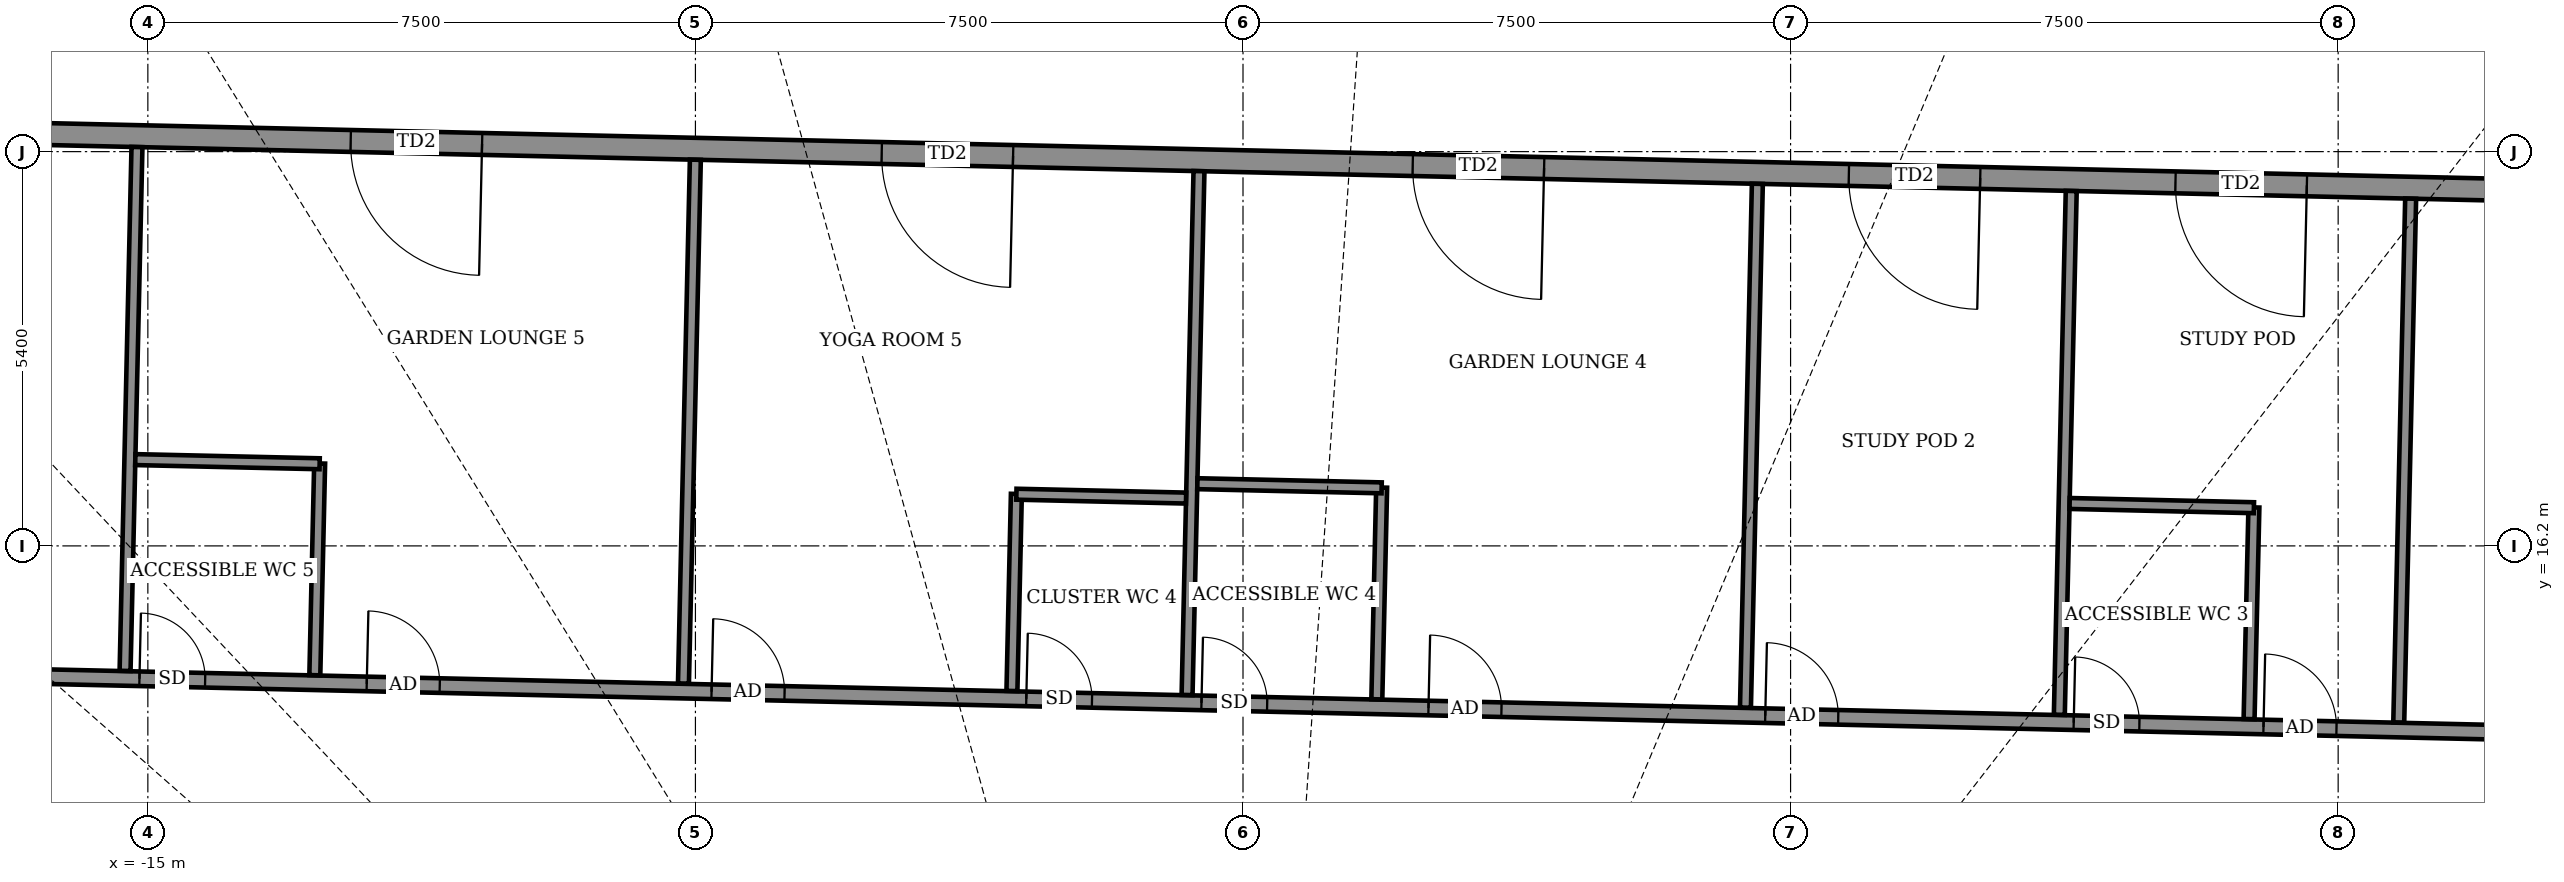
"""IFC4 building model, lengths in metres.
Left out: names, types, materials, properties, quantities, classifications, styles, units other than length and angle.
Written with IfcOpenShell. Run it as: python <this file> out.ifc"""

import sys

from ifc_helpers import new_model, si_unit, direction, frame, frame_2d, origin, place, context, subcontext, project, spatial, rectangle, extrude, element, fill, save


model = new_model("IFC4")
c1 = context("Model", 3, precision=1e-05, world=origin(), true_north=direction((0.0, 1.0)))
c2 = subcontext(c1, "Body", "Model", "MODEL_VIEW")
j1 = project(units=[si_unit("LENGTHUNIT", "METRE"), si_unit("PLANEANGLEUNIT", "RADIAN")], contexts=[c1])
p1 = place(None, origin())
s1 = spatial("IfcSite", under=j1, at=p1, CompositionType="ELEMENT")
p2 = place(p1, origin())
s2 = spatial("IfcBuilding", under=s1, at=p2, CompositionType="ELEMENT")
p3 = place(p2, frame((0.0, 0.0, 337.9)))
s3 = spatial("IfcBuildingStorey", under=s2, at=p3, CompositionType="ELEMENT", Elevation=337.9)
p4 = place(p3, frame((23.394, 20.938, 0.0), z_axis=(0.0, 0.0, 1.0), x_axis=(-0.99974255281, 0.02268982375, 0.0)))
e1 = element("IfcWall", 1, at=p4, inside=s3, PredefinedType="SOLIDWALL", context=c2, shape_type="SweptSolid", body=[
    extrude(rectangle(XDim=43.9, YDim=0.3, at=frame_2d((21.95, 0.0))), origin(), (0.0, 0.0, 1.0), 2.1),
])
p5 = place(p4, frame((3.151, 0.0, 0.0)))
e2 = element("IfcOpeningElement", 2, at=p5, cuts=e1, PredefinedType="OPENING", context=c2, shape_type="SweptSolid", body=[
    extrude(rectangle(XDim=1.8, YDim=2.0, at=frame_2d((0.9, 1.0))), frame((0.0, 0.16, 0.0), z_axis=(0.0, -1.0, 0.0), x_axis=(1.0, 0.0, 0.0)), (0.0, 0.0, 1.0), 0.32),
])
p6 = place(p4, frame((8.825, 0.0, 0.0)))
e3 = element("IfcOpeningElement", 3, at=p6, cuts=e1, PredefinedType="OPENING", context=c2, shape_type="SweptSolid", body=[
    extrude(rectangle(XDim=1.8, YDim=2.0, at=frame_2d((0.9, 1.0))), frame((0.0, 0.16, 0.0), z_axis=(0.0, -1.0, 0.0), x_axis=(1.0, 0.0, 0.0)), (0.0, 0.0, 1.0), 0.32),
])
p7 = place(p4, frame((13.3, 0.0, 0.0)))
e4 = element("IfcOpeningElement", 4, at=p7, cuts=e1, PredefinedType="OPENING", context=c2, shape_type="SweptSolid", body=[
    extrude(rectangle(XDim=1.8, YDim=2.0, at=frame_2d((0.9, 1.0))), frame((0.0, 0.16, 0.0), z_axis=(0.0, -1.0, 0.0), x_axis=(1.0, 0.0, 0.0)), (0.0, 0.0, 1.0), 0.32),
])
p8 = place(p4, frame((19.275, 0.0, 0.0)))
e5 = element("IfcOpeningElement", 5, at=p8, cuts=e1, PredefinedType="OPENING", context=c2, shape_type="SweptSolid", body=[
    extrude(rectangle(XDim=1.8, YDim=2.0, at=frame_2d((0.9, 1.0))), frame((0.0, 0.16, 0.0), z_axis=(0.0, -1.0, 0.0), x_axis=(1.0, 0.0, 0.0)), (0.0, 0.0, 1.0), 0.32),
])
p9 = place(p4, frame((26.55, 0.0, 0.0)))
e6 = element("IfcOpeningElement", 6, at=p9, cuts=e1, PredefinedType="OPENING", context=c2, shape_type="SweptSolid", body=[
    extrude(rectangle(XDim=1.8, YDim=2.0, at=frame_2d((0.9, 1.0))), frame((0.0, 0.16, 0.0), z_axis=(0.0, -1.0, 0.0), x_axis=(1.0, 0.0, 0.0)), (0.0, 0.0, 1.0), 0.32),
])
p10 = place(p4, frame((33.825, 0.0, 0.0)))
e7 = element("IfcOpeningElement", 7, at=p10, cuts=e1, PredefinedType="OPENING", context=c2, shape_type="SweptSolid", body=[
    extrude(rectangle(XDim=1.8, YDim=2.0, at=frame_2d((0.9, 1.0))), frame((0.0, 0.16, 0.0), z_axis=(0.0, -1.0, 0.0), x_axis=(1.0, 0.0, 0.0)), (0.0, 0.0, 1.0), 0.32),
])
p11 = place(p4, frame((40.4, 0.0, 0.0)))
e8 = element("IfcOpeningElement", 8, at=p11, cuts=e1, PredefinedType="OPENING", context=c2, shape_type="SweptSolid", body=[
    extrude(rectangle(XDim=1.8, YDim=2.0, at=frame_2d((0.9, 1.0))), frame((0.0, 0.16, 0.0), z_axis=(0.0, -1.0, 0.0), x_axis=(1.0, 0.0, 0.0)), (0.0, 0.0, 1.0), 0.32),
])
p12 = place(p3, frame((-23.213, 14.564, 0.0), z_axis=(0.0, 0.0, 1.0), x_axis=(0.999742437097, -0.022694921611, 0.0)))
e9 = element("IfcWall", 9, at=p12, inside=s3, PredefinedType="PARTITIONING", context=c2, shape_type="SweptSolid", body=[
    extrude(rectangle(XDim=49.0, YDim=0.2, at=frame_2d((24.5, 0.0))), origin(), (0.0, 0.0, 1.0), 2.1),
])
p13 = place(p12, frame((42.951, 0.0, 0.0)))
e10 = element("IfcOpeningElement", 10, at=p13, cuts=e9, PredefinedType="OPENING", context=c2, shape_type="SweptSolid", body=[
    extrude(rectangle(XDim=1.0, YDim=2.1, at=frame_2d((0.5, 1.05))), frame((0.0, 0.11, 0.0), z_axis=(0.0, -1.0, 0.0), x_axis=(1.0, 0.0, 0.0)), (0.0, 0.0, 1.0), 0.22),
])
p14 = place(p12, frame((37.2, 0.0, 0.0)))
e11 = element("IfcOpeningElement", 11, at=p14, cuts=e9, PredefinedType="OPENING", context=c2, shape_type="SweptSolid", body=[
    extrude(rectangle(XDim=1.0, YDim=2.1, at=frame_2d((0.5, 1.05))), frame((0.0, 0.11, 0.0), z_axis=(0.0, -1.0, 0.0), x_axis=(1.0, 0.0, 0.0)), (0.0, 0.0, 1.0), 0.22),
])
p15 = place(p12, frame((34.6, 0.0, 0.0)))
e12 = element("IfcOpeningElement", 12, at=p15, cuts=e9, PredefinedType="OPENING", context=c2, shape_type="SweptSolid", body=[
    extrude(rectangle(XDim=0.9, YDim=2.1, at=frame_2d((0.45, 1.05))), frame((0.0, 0.11, 0.0), z_axis=(0.0, -1.0, 0.0), x_axis=(1.0, 0.0, 0.0)), (0.0, 0.0, 1.0), 0.22),
])
p16 = place(p12, frame((30.374, 0.0, 0.0)))
e13 = element("IfcOpeningElement", 13, at=p16, cuts=e9, PredefinedType="OPENING", context=c2, shape_type="SweptSolid", body=[
    extrude(rectangle(XDim=1.0, YDim=2.1, at=frame_2d((0.5, 1.05))), frame((0.0, 0.11, 0.0), z_axis=(0.0, -1.0, 0.0), x_axis=(1.0, 0.0, 0.0)), (0.0, 0.0, 1.0), 0.22),
])
p17 = place(p12, frame((25.76, 0.0, 0.0)))
e14 = element("IfcOpeningElement", 14, at=p17, cuts=e9, PredefinedType="OPENING", context=c2, shape_type="SweptSolid", body=[
    extrude(rectangle(XDim=1.0, YDim=2.1, at=frame_2d((0.5, 1.05))), frame((0.0, 0.11, 0.0), z_axis=(0.0, -1.0, 0.0), x_axis=(1.0, 0.0, 0.0)), (0.0, 0.0, 1.0), 0.22),
])
p18 = place(p12, frame((22.65, 0.0, 0.0)))
e15 = element("IfcOpeningElement", 15, at=p18, cuts=e9, PredefinedType="OPENING", context=c2, shape_type="SweptSolid", body=[
    extrude(rectangle(XDim=0.9, YDim=2.1, at=frame_2d((0.45, 1.05))), frame((0.0, 0.11, 0.0), z_axis=(0.0, -1.0, 0.0), x_axis=(1.0, 0.0, 0.0)), (0.0, 0.0, 1.0), 0.22),
])
p19 = place(p12, frame((15.938, 0.0, 0.0)))
e16 = element("IfcOpeningElement", 16, at=p19, cuts=e9, PredefinedType="OPENING", context=c2, shape_type="SweptSolid", body=[
    extrude(rectangle(XDim=1.0, YDim=2.1, at=frame_2d((0.5, 1.05))), frame((0.0, 0.11, 0.0), z_axis=(0.0, -1.0, 0.0), x_axis=(1.0, 0.0, 0.0)), (0.0, 0.0, 1.0), 0.22),
])
p20 = place(p12, frame((20.25, 0.0, 0.0)))
e17 = element("IfcOpeningElement", 17, at=p20, cuts=e9, PredefinedType="OPENING", context=c2, shape_type="SweptSolid", body=[
    extrude(rectangle(XDim=0.9, YDim=2.1, at=frame_2d((0.45, 1.05))), frame((0.0, 0.11, 0.0), z_axis=(0.0, -1.0, 0.0), x_axis=(1.0, 0.0, 0.0)), (0.0, 0.0, 1.0), 0.22),
])
p21 = place(p12, frame((11.214, 0.0, 0.0)))
e18 = element("IfcOpeningElement", 18, at=p21, cuts=e9, PredefinedType="OPENING", context=c2, shape_type="SweptSolid", body=[
    extrude(rectangle(XDim=1.0, YDim=2.1, at=frame_2d((0.5, 1.05))), frame((0.0, 0.11, 0.0), z_axis=(0.0, -1.0, 0.0), x_axis=(1.0, 0.0, 0.0)), (0.0, 0.0, 1.0), 0.22),
])
p22 = place(p12, frame((8.1, 0.0, 0.0)))
e19 = element("IfcOpeningElement", 19, at=p22, cuts=e9, PredefinedType="OPENING", context=c2, shape_type="SweptSolid", body=[
    extrude(rectangle(XDim=0.9, YDim=2.1, at=frame_2d((0.45, 1.05))), frame((0.0, 0.11, 0.0), z_axis=(0.0, -1.0, 0.0), x_axis=(1.0, 0.0, 0.0)), (0.0, 0.0, 1.0), 0.22),
])
p23 = place(p12, frame((1.387, 0.0, 0.0)))
e20 = element("IfcOpeningElement", 20, at=p23, cuts=e9, PredefinedType="OPENING", context=c2, shape_type="SweptSolid", body=[
    extrude(rectangle(XDim=1.0, YDim=2.1, at=frame_2d((0.5, 1.05))), frame((0.0, 0.11, 0.0), z_axis=(0.0, -1.0, 0.0), x_axis=(1.0, 0.0, 0.0)), (0.0, 0.0, 1.0), 0.22),
])
p24 = place(p3, frame((-15.312, 14.488, 0.0), z_axis=(0.0, 0.0, 1.0), x_axis=(0.022723723534, 0.999741782856, 0.0)))
e21 = element("IfcWall", 21, at=p24, inside=s3, PredefinedType="PARTITIONING", context=c2, shape_type="SweptSolid", body=[
    extrude(rectangle(XDim=7.177, YDim=0.15, at=frame_2d((3.588, 0.0))), origin(), (0.0, 0.0, 1.0), 2.1),
])
p25 = place(p3, frame((-12.713, 14.429, 0.0), z_axis=(0.0, 0.0, 1.0), x_axis=(0.022723317103, 0.999741792094, 0.0)))
e22 = element("IfcWall", 22, at=p25, inside=s3, PredefinedType="PARTITIONING", context=c2, shape_type="SweptSolid", body=[
    extrude(rectangle(XDim=2.901, YDim=0.15, at=frame_2d((1.45, 0.0))), origin(), (0.0, 0.0, 1.0), 2.1),
])
p26 = place(p3, frame((-7.664, 14.315, 0.0), z_axis=(0.0, 0.0, 1.0), x_axis=(0.022726815178, 0.99974171258, 0.0)))
e23 = element("IfcWall", 23, at=p26, inside=s3, PredefinedType="PARTITIONING", context=c2, shape_type="SweptSolid", body=[
    extrude(rectangle(XDim=7.176, YDim=0.15, at=frame_2d((3.588, 0.0))), origin(), (0.0, 0.0, 1.0), 4.05),
])
p27 = place(p3, frame((-3.165, 14.213, 0.0), z_axis=(0.0, 0.0, 1.0), x_axis=(0.022606377605, 0.999744443191, 0.0)))
e24 = element("IfcWall", 24, at=p27, inside=s3, PredefinedType="PARTITIONING", context=c2, shape_type="SweptSolid", body=[
    extrude(rectangle(XDim=2.7, YDim=0.15, at=frame_2d((1.35, 0.0))), origin(), (0.0, 0.0, 1.0), 2.65),
])
p28 = place(p3, frame((-0.766, 14.158, 0.0), z_axis=(0.0, 0.0, 1.0), x_axis=(0.022723723534, 0.999741782856, 0.0)))
e25 = element("IfcWall", 25, at=p28, inside=s3, PredefinedType="PARTITIONING", context=c2, shape_type="SweptSolid", body=[
    extrude(rectangle(XDim=7.177, YDim=0.15, at=frame_2d((3.588, 0.0))), origin(), (0.0, 0.0, 1.0), 4.05),
])
p29 = place(p3, frame((1.833, 14.099, 0.0), z_axis=(0.0, 0.0, 1.0), x_axis=(0.022725229174, 0.999741748633, 0.0)))
e26 = element("IfcWall", 26, at=p29, inside=s3, PredefinedType="PARTITIONING", context=c2, shape_type="SweptSolid", body=[
    extrude(rectangle(XDim=2.901, YDim=0.15, at=frame_2d((1.45, 0.0))), origin(), (0.0, 0.0, 1.0), 2.75),
])
p30 = place(p3, frame((6.882, 13.985, 0.0), z_axis=(0.0, 0.0, 1.0), x_axis=(0.02269358242, 0.999742467497, 0.0)))
e27 = element("IfcWall", 27, at=p30, inside=s3, PredefinedType="PARTITIONING", context=c2, shape_type="SweptSolid", body=[
    extrude(rectangle(XDim=7.176, YDim=0.15, at=frame_2d((3.588, 0.0))), origin(), (0.0, 0.0, 1.0), 2.55),
])
p31 = place(p3, frame((11.181, 13.887, 0.0), z_axis=(0.0, 0.0, 1.0), x_axis=(0.022726815178, 0.99974171258, 0.0)))
e28 = element("IfcWall", 28, at=p31, inside=s3, PredefinedType="PARTITIONING", context=c2, shape_type="SweptSolid", body=[
    extrude(rectangle(XDim=7.176, YDim=0.15, at=frame_2d((3.588, 0.0))), origin(), (0.0, 0.0, 1.0), 2.45),
])
p32 = place(p3, frame((13.78, 13.828, 0.0), z_axis=(0.0, 0.0, 1.0), x_axis=(0.022730967319, 0.999741618182, 0.0)))
e29 = element("IfcWall", 29, at=p32, inside=s3, PredefinedType="PARTITIONING", context=c2, shape_type="SweptSolid", body=[
    extrude(rectangle(XDim=2.9, YDim=0.15, at=frame_2d((1.45, 0.0))), origin(), (0.0, 0.0, 1.0), 2.45),
])
p33 = place(p3, frame((15.83, 13.782, 0.0), z_axis=(0.0, 0.0, 1.0), x_axis=(0.022692810533, 0.999742485018, 0.0)))
e30 = element("IfcWall", 30, at=p33, inside=s3, PredefinedType="PARTITIONING", context=c2, shape_type="SweptSolid", body=[
    extrude(rectangle(XDim=7.176, YDim=0.15, at=frame_2d((3.588, 0.0))), origin(), (0.0, 0.0, 1.0), 2.45),
])
p34 = place(p3, frame((-3.104, 16.908, 0.0), z_axis=(0.0, 0.0, 1.0), x_axis=(0.999740260747, -0.02279059109, 0.0)))
e31 = element("IfcWall", 31, at=p34, inside=s3, PredefinedType="PARTITIONING", context=c2, shape_type="SweptSolid", body=[
    extrude(rectangle(XDim=2.324, YDim=0.15, at=frame_2d((1.162, 0.0))), origin(), (0.0, 0.0, 1.0), 4.05),
])
p35 = place(p3, frame((-15.172, 17.382, 0.0), z_axis=(0.0, 0.0, 1.0), x_axis=(0.999744175585, -0.022618209135, 0.0)))
e32 = element("IfcWall", 32, at=p35, inside=s3, PredefinedType="PARTITIONING", context=c2, shape_type="SweptSolid", body=[
    extrude(rectangle(XDim=2.526, YDim=0.15, at=frame_2d((1.263, 0.0))), origin(), (0.0, 0.0, 1.0), 4.05),
])
p36 = place(p3, frame((-0.625, 17.052, 0.0), z_axis=(0.0, 0.0, 1.0), x_axis=(0.9997461113, -0.022532486354, 0.0)))
e33 = element("IfcWall", 33, at=p36, inside=s3, PredefinedType="PARTITIONING", context=c2, shape_type="SweptSolid", body=[
    extrude(rectangle(XDim=2.525, YDim=0.15, at=frame_2d((1.262, 0.0))), origin(), (0.0, 0.0, 1.0), 2.75),
])
p37 = place(p3, frame((11.322, 16.781, 0.0), z_axis=(0.0, 0.0, 1.0), x_axis=(0.999735102249, -0.023015762656, 0.0)))
e34 = element("IfcWall", 34, at=p37, inside=s3, PredefinedType="PARTITIONING", context=c2, shape_type="SweptSolid", body=[
    extrude(rectangle(XDim=2.525, YDim=0.15, at=frame_2d((1.262, 0.0))), origin(), (0.0, 0.0, 1.0), 2.45),
])
p38 = place(p6, origin())
e35 = element("IfcDoor", 35, at=p38, inside=s3, OperationType="DOUBLE_DOOR_SINGLE_SWING", PredefinedType="DOOR", context=c2, shape_type="SweptSolid", body=[
    extrude(rectangle(XDim=1.8, YDim=2.0, at=frame_2d((0.9, 1.0))), frame((0.0, 0.025, 0.0), z_axis=(0.0, -1.0, 0.0), x_axis=(1.0, 0.0, 0.0)), (0.0, 0.0, 1.0), 0.05),
])
fill(e3, e35)
p39 = place(p7, origin())
e36 = element("IfcDoor", 36, at=p39, inside=s3, OperationType="DOUBLE_DOOR_SINGLE_SWING", PredefinedType="DOOR", context=c2, shape_type="SweptSolid", body=[
    extrude(rectangle(XDim=1.8, YDim=2.0, at=frame_2d((0.9, 1.0))), frame((0.0, 0.025, 0.0), z_axis=(0.0, -1.0, 0.0), x_axis=(1.0, 0.0, 0.0)), (0.0, 0.0, 1.0), 0.05),
])
fill(e4, e36)
p40 = place(p8, origin())
e37 = element("IfcDoor", 37, at=p40, inside=s3, OperationType="DOUBLE_DOOR_SINGLE_SWING", PredefinedType="DOOR", context=c2, shape_type="SweptSolid", body=[
    extrude(rectangle(XDim=1.8, YDim=2.0, at=frame_2d((0.9, 1.0))), frame((0.0, 0.025, 0.0), z_axis=(0.0, -1.0, 0.0), x_axis=(1.0, 0.0, 0.0)), (0.0, 0.0, 1.0), 0.05),
])
fill(e5, e37)
p41 = place(p9, origin())
e38 = element("IfcDoor", 38, at=p41, inside=s3, OperationType="DOUBLE_DOOR_SINGLE_SWING", PredefinedType="DOOR", context=c2, shape_type="SweptSolid", body=[
    extrude(rectangle(XDim=1.8, YDim=2.0, at=frame_2d((0.9, 1.0))), frame((0.0, 0.025, 0.0), z_axis=(0.0, -1.0, 0.0), x_axis=(1.0, 0.0, 0.0)), (0.0, 0.0, 1.0), 0.05),
])
fill(e6, e38)
p42 = place(p10, origin())
e39 = element("IfcDoor", 39, at=p42, inside=s3, OperationType="DOUBLE_DOOR_SINGLE_SWING", PredefinedType="DOOR", context=c2, shape_type="SweptSolid", body=[
    extrude(rectangle(XDim=1.8, YDim=2.0, at=frame_2d((0.9, 1.0))), frame((0.0, 0.025, 0.0), z_axis=(0.0, -1.0, 0.0), x_axis=(1.0, 0.0, 0.0)), (0.0, 0.0, 1.0), 0.05),
])
fill(e7, e39)
p43 = place(p14, origin())
e40 = element("IfcDoor", 40, at=p43, inside=s3, OperationType="SINGLE_SWING_LEFT", PredefinedType="DOOR", context=c2, shape_type="SweptSolid", body=[
    extrude(rectangle(XDim=1.0, YDim=2.1, at=frame_2d((0.5, 1.05))), frame((0.0, 0.025, 0.0), z_axis=(0.0, -1.0, 0.0), x_axis=(1.0, 0.0, 0.0)), (0.0, 0.0, 1.0), 0.05),
])
fill(e11, e40)
p44 = place(p15, origin())
e41 = element("IfcDoor", 41, at=p44, inside=s3, OperationType="SINGLE_SWING_RIGHT", PredefinedType="DOOR", context=c2, shape_type="SweptSolid", body=[
    extrude(rectangle(XDim=0.9, YDim=2.1, at=frame_2d((0.45, 1.05))), frame((0.0, 0.025, 0.0), z_axis=(0.0, -1.0, 0.0), x_axis=(1.0, 0.0, 0.0)), (0.0, 0.0, 1.0), 0.05),
])
fill(e12, e41)
p45 = place(p16, origin())
e42 = element("IfcDoor", 42, at=p45, inside=s3, OperationType="SINGLE_SWING_RIGHT", PredefinedType="DOOR", context=c2, shape_type="SweptSolid", body=[
    extrude(rectangle(XDim=1.0, YDim=2.1, at=frame_2d((0.5, 1.05))), frame((0.0, 0.025, 0.0), z_axis=(0.0, -1.0, 0.0), x_axis=(1.0, 0.0, 0.0)), (0.0, 0.0, 1.0), 0.05),
])
fill(e13, e42)
p46 = place(p17, origin())
e43 = element("IfcDoor", 43, at=p46, inside=s3, OperationType="SINGLE_SWING_LEFT", PredefinedType="DOOR", context=c2, shape_type="SweptSolid", body=[
    extrude(rectangle(XDim=1.0, YDim=2.1, at=frame_2d((0.5, 1.05))), frame((0.0, 0.025, 0.0), z_axis=(0.0, -1.0, 0.0), x_axis=(1.0, 0.0, 0.0)), (0.0, 0.0, 1.0), 0.05),
])
fill(e14, e43)
p47 = place(p18, origin())
e44 = element("IfcDoor", 44, at=p47, inside=s3, OperationType="SINGLE_SWING_LEFT", PredefinedType="DOOR", context=c2, shape_type="SweptSolid", body=[
    extrude(rectangle(XDim=0.9, YDim=2.1, at=frame_2d((0.45, 1.05))), frame((0.0, 0.025, 0.0), z_axis=(0.0, -1.0, 0.0), x_axis=(1.0, 0.0, 0.0)), (0.0, 0.0, 1.0), 0.05),
])
fill(e15, e44)
p48 = place(p19, origin())
e45 = element("IfcDoor", 45, at=p48, inside=s3, OperationType="SINGLE_SWING_RIGHT", PredefinedType="DOOR", context=c2, shape_type="SweptSolid", body=[
    extrude(rectangle(XDim=1.0, YDim=2.1, at=frame_2d((0.5, 1.05))), frame((0.0, 0.025, 0.0), z_axis=(0.0, -1.0, 0.0), x_axis=(1.0, 0.0, 0.0)), (0.0, 0.0, 1.0), 0.05),
])
fill(e16, e45)
p49 = place(p20, origin())
e46 = element("IfcDoor", 46, at=p49, inside=s3, OperationType="SINGLE_SWING_RIGHT", PredefinedType="DOOR", context=c2, shape_type="SweptSolid", body=[
    extrude(rectangle(XDim=0.9, YDim=2.1, at=frame_2d((0.45, 1.05))), frame((0.0, 0.025, 0.0), z_axis=(0.0, -1.0, 0.0), x_axis=(1.0, 0.0, 0.0)), (0.0, 0.0, 1.0), 0.05),
])
fill(e17, e46)
p50 = place(p21, origin())
e47 = element("IfcDoor", 47, at=p50, inside=s3, OperationType="SINGLE_SWING_LEFT", PredefinedType="DOOR", context=c2, shape_type="SweptSolid", body=[
    extrude(rectangle(XDim=1.0, YDim=2.1, at=frame_2d((0.5, 1.05))), frame((0.0, 0.025, 0.0), z_axis=(0.0, -1.0, 0.0), x_axis=(1.0, 0.0, 0.0)), (0.0, 0.0, 1.0), 0.05),
])
fill(e18, e47)
p51 = place(p22, origin())
e48 = element("IfcDoor", 48, at=p51, inside=s3, OperationType="SINGLE_SWING_LEFT", PredefinedType="DOOR", context=c2, shape_type="SweptSolid", body=[
    extrude(rectangle(XDim=0.9, YDim=2.1, at=frame_2d((0.45, 1.05))), frame((0.0, 0.025, 0.0), z_axis=(0.0, -1.0, 0.0), x_axis=(1.0, 0.0, 0.0)), (0.0, 0.0, 1.0), 0.05),
])
fill(e19, e48)
save(model, sys.argv[1])
